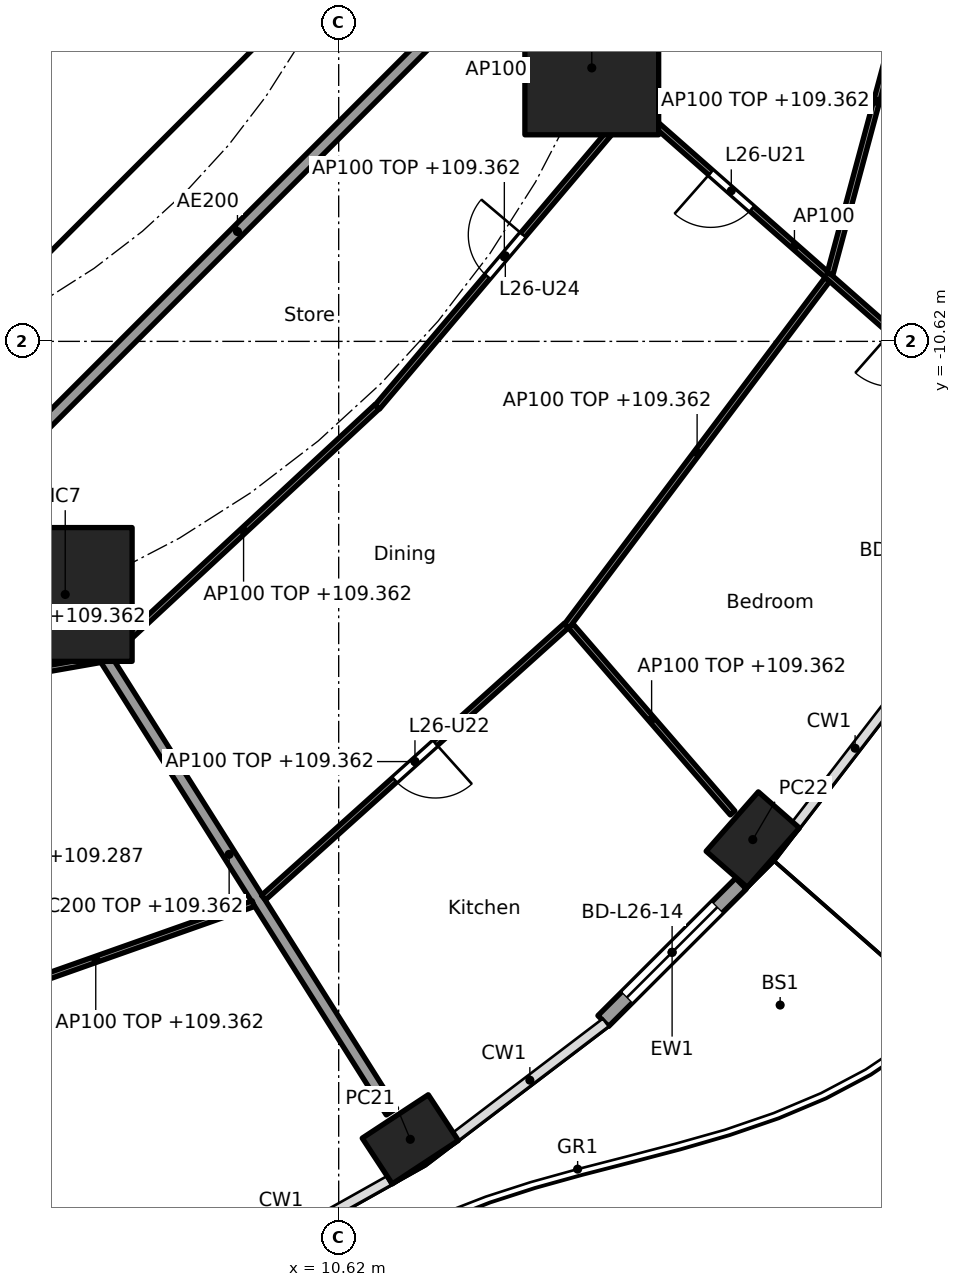
"""IFC4 building model, lengths in metres.
Left out: names, types, materials, properties, quantities, classifications, styles, units other than length and angle.
Written with IfcOpenShell. Run it as: python <this file> out.ifc"""

import sys

from ifc_helpers import new_model, si_unit, direction, frame, frame_2d, origin, origin_2d, place, context, subcontext, project, spatial, rectangle, hollow_rectangle, extrude, element, fill, save


model = new_model("IFC4")
c1 = context("Model", 3, precision=1e-05, world=origin(), true_north=direction((0.0, 1.0)))
c2 = subcontext(c1, "Body", "Model", "MODEL_VIEW")
j1 = project(units=[si_unit("LENGTHUNIT", "METRE"), si_unit("PLANEANGLEUNIT", "RADIAN")], contexts=[c1])
p1 = place(None, origin())
s1 = spatial("IfcSite", under=j1, at=p1, CompositionType="ELEMENT")
p2 = place(p1, origin())
s2 = spatial("IfcBuilding", under=s1, at=p2, CompositionType="ELEMENT")
p3 = place(p2, frame((0.0, 0.0, 106.6)))
s3 = spatial("IfcBuildingStorey", under=s2, at=p3, CompositionType="ELEMENT", Elevation=106.6)
for number, where, z_axis, x_axis in (
    (1, (11.798, -23.742, 0.0), (0.0, 0.0, 1.0), (0.836, 0.549, 0.0)),
    (2, (17.43, -18.813, 0.0), (0.0, 0.0, 1.0), (0.66, 0.751, 0.0)),
):
    element("IfcColumn", number, at=place(p3, frame(where, z_axis=z_axis, x_axis=x_axis)), inside=s3, PredefinedType="COLUMN", context=c2, shape_type="SweptSolid", body=[
        extrude(hollow_rectangle(XDim=1.3, YDim=0.9, WallThickness=0.045, at=origin_2d()), origin(), (0.0, 0.0, 1.0), 3.7),
    ])
for number, where, z_axis, x_axis in (
    (3, (6.123, -14.782, 0.0), (0.0, 0.0, 1.0), (1.0, 0.0, 0.0)),
    (4, (14.782, -6.123, 0.0), (0.0, 0.0, 1.0), (1.0, 0.0, 0.0)),
):
    element("IfcColumn", number, at=place(p3, frame(where, z_axis=z_axis, x_axis=x_axis)), inside=s3, PredefinedType="COLUMN", context=c2, shape_type="SweptSolid", body=[
        extrude(rectangle(XDim=2.2, YDim=2.2, at=origin_2d()), origin(), (0.0, 0.0, 1.0), 3.7),
    ])
p4 = place(p3, frame((17.235, -19.537, 0.0), z_axis=(0.0, 0.0, 1.0), x_axis=(-0.707793551437, -0.706419343269, 0.0)))
e5 = element("IfcWall", 5, at=p4, inside=s3, PredefinedType="SOLIDWALL", context=c2, shape_type="SweptSolid", body=[
    extrude(rectangle(XDim=3.198, YDim=0.25, at=frame_2d((1.599, 0.0))), origin(), (0.0, 0.0, 1.0), 3.44),
])
p5 = place(p4, frame((0.549, 0.0, 0.0)))
e6 = element("IfcOpeningElement", 6, at=p5, cuts=e5, PredefinedType="OPENING", context=c2, shape_type="SweptSolid", body=[
    extrude(rectangle(XDim=2.1, YDim=2.4, at=frame_2d((1.05, 1.2))), frame((0.0, 0.135, 0.0), z_axis=(0.0, -1.0, 0.0), x_axis=(1.0, 0.0, 0.0)), (0.0, 0.0, 1.0), 0.27),
])
p6 = place(p3, frame((4.613, -9.988, 0.0), z_axis=(0.0, 0.0, 1.0), x_axis=(0.707106781187, 0.707106781187, 0.0)))
e7 = element("IfcWall", 7, at=p6, inside=s3, PredefinedType="SHEAR", context=c2, shape_type="SweptSolid", body=[
    extrude(rectangle(XDim=7.602, YDim=0.6, at=frame_2d((3.801, 0.0))), origin(), (0.0, 0.0, 1.0), 3.44),
])
p7 = place(p6, frame((3.201, 0.0, 0.0)))
e8 = element("IfcOpeningElement", 8, at=p7, cuts=e7, PredefinedType="OPENING", context=c2, shape_type="SweptSolid", body=[
    extrude(rectangle(XDim=1.2, YDim=2.1, at=frame_2d((0.6, 1.05))), frame((0.0, 0.31, 0.0), z_axis=(0.0, -1.0, 0.0), x_axis=(1.0, 0.0, 0.0)), (0.0, 0.0, 1.0), 0.62),
])
p8 = place(p3, frame((5.243, -12.657, 0.0), z_axis=(0.0, 0.0, 1.0), x_axis=(0.382747093259, -0.923853160736, 0.0)))
e9 = element("IfcWall", 9, at=p8, inside=s3, PredefinedType="PARTITIONING", context=c2, shape_type="SweptSolid", body=[
    extrude(rectangle(XDim=2.2, YDim=0.2, at=frame_2d((1.1, 0.0))), origin(), (0.0, 0.0, 1.0), 3.44),
])
p9 = place(p3, frame((6.15, -14.824, 0.0), z_axis=(0.0, 0.0, 1.0), x_axis=(0.533492589682, -0.845804739142, 0.0)))
e10 = element("IfcWall", 10, at=p9, inside=s3, PredefinedType="PARTITIONING", context=c2, shape_type="SweptSolid", body=[
    extrude(rectangle(XDim=10.006, YDim=0.2, at=frame_2d((5.003, 0.0))), origin(), (0.0, 0.0, 1.0), 2.762),
])
p10 = place(p3, frame((5.275, -12.494, 0.0), z_axis=(0.0, 0.0, 1.0), x_axis=(0.707106781187, 0.707106781187, 0.0)))
e11 = element("IfcWall", 11, at=p10, inside=s3, PredefinedType="PARTITIONING", context=c2, shape_type="SweptSolid", body=[
    extrude(rectangle(XDim=10.409, YDim=0.2, at=frame_2d((5.205, 0.0))), origin(), (0.0, 0.0, 1.0), 3.44),
])
p11 = place(p3, frame((2.667, -16.558, 0.0), z_axis=(0.0, 0.0, 1.0), x_axis=(0.984996445375, 0.172574629069, 0.0)))
e12 = element("IfcWall", 12, at=p11, inside=s3, PredefinedType="PARTITIONING", context=c2, shape_type="SweptSolid", body=[
    extrude(rectangle(XDim=4.084, YDim=0.1, at=frame_2d((2.042, 0.0))), origin(), (0.0, 0.0, 1.0), 2.762),
])
p12 = place(p3, frame((4.034, -21.698, 0.0), z_axis=(0.0, 0.0, 1.0), x_axis=(0.942861482644, 0.33318497047, 0.0)))
e13 = element("IfcWall", 13, at=p12, inside=s3, PredefinedType="PARTITIONING", context=c2, shape_type="SweptSolid", body=[
    extrude(rectangle(XDim=5.495, YDim=0.1, at=frame_2d((2.748, 0.0))), origin(), (0.0, 0.0, 1.0), 2.762),
])
p13 = place(p3, frame((6.861, -15.768, 0.0), z_axis=(0.0, 0.0, 1.0), x_axis=(0.733011256509, 0.680216508056, 0.0)))
e14 = element("IfcWall", 14, at=p13, inside=s3, PredefinedType="PARTITIONING", context=c2, shape_type="SweptSolid", body=[
    extrude(rectangle(XDim=5.989, YDim=0.1, at=frame_2d((2.994, 0.0))), origin(), (0.0, 0.0, 1.0), 2.762),
])
p14 = place(p3, frame((9.384, -19.768, 0.0), z_axis=(0.0, 0.0, 1.0), x_axis=(0.74387407395, 0.668319805262, 0.0)))
e15 = element("IfcWall", 15, at=p14, inside=s3, PredefinedType="PARTITIONING", context=c2, shape_type="SweptSolid", body=[
    extrude(rectangle(XDim=6.695, YDim=0.1, at=frame_2d((3.348, 0.0))), origin(), (0.0, 0.0, 1.0), 2.762),
])
p15 = place(p14, frame((2.898, 0.0, 0.0)))
e16 = element("IfcOpeningElement", 16, at=p15, cuts=e15, PredefinedType="OPENING", context=c2, shape_type="SweptSolid", body=[
    extrude(rectangle(XDim=0.9, YDim=2.1, at=frame_2d((0.45, 1.05))), frame((0.0, 0.06, 0.0), z_axis=(0.0, -1.0, 0.0), x_axis=(1.0, 0.0, 0.0)), (0.0, 0.0, 1.0), 0.12),
])
p16 = place(p3, frame((11.255, -11.699, 0.0), z_axis=(0.0, 0.0, 1.0), x_axis=(0.64610637779, 0.763247370503, 0.0)))
e17 = element("IfcWall", 17, at=p16, inside=s3, PredefinedType="PARTITIONING", context=c2, shape_type="SweptSolid", body=[
    extrude(rectangle(XDim=6.467, YDim=0.1, at=frame_2d((3.233, 0.0))), origin(), (0.0, 0.0, 1.0), 2.762),
])
p17 = place(p16, frame((2.809, 0.0, 0.0)))
e18 = element("IfcOpeningElement", 18, at=p17, cuts=e17, PredefinedType="OPENING", context=c2, shape_type="SweptSolid", body=[
    extrude(rectangle(XDim=0.9, YDim=2.1, at=frame_2d((0.45, 1.05))), frame((0.0, 0.06, 0.0), z_axis=(0.0, -1.0, 0.0), x_axis=(1.0, 0.0, 0.0)), (0.0, 0.0, 1.0), 0.12),
])
p18 = place(p3, frame((14.435, -15.297, 0.0), z_axis=(0.0, 0.0, 1.0), x_axis=(0.654405107766, -0.756144136345, 0.0)))
e19 = element("IfcWall", 19, at=p18, inside=s3, PredefinedType="PARTITIONING", context=c2, shape_type="SweptSolid", body=[
    extrude(rectangle(XDim=4.07, YDim=0.1, at=frame_2d((2.035, 0.0))), origin(), (0.0, 0.0, 1.0), 2.762),
])
p19 = place(p3, frame((14.372, -15.3, 0.0), z_axis=(0.0, 0.0, 1.0), x_axis=(0.600996629562, 0.79925155693, 0.0)))
e20 = element("IfcWall", 20, at=p19, inside=s3, PredefinedType="PARTITIONING", context=c2, shape_type="SweptSolid", body=[
    extrude(rectangle(XDim=7.13, YDim=0.1, at=frame_2d((3.565, 0.0))), origin(), (0.0, 0.0, 1.0), 2.762),
])
p20 = place(p3, frame((12.657, -5.243, 0.0), z_axis=(0.0, 0.0, 1.0), x_axis=(0.923848837015, -0.382757529444, 0.0)))
e21 = element("IfcWall", 21, at=p20, inside=s3, PredefinedType="PARTITIONING", context=c2, shape_type="SweptSolid", body=[
    extrude(rectangle(XDim=2.25, YDim=0.1, at=frame_2d((1.125, 0.0))), origin(), (0.0, 0.0, 1.0), 3.44),
])
p21 = place(p3, frame((14.82, -6.156, 0.0), z_axis=(0.0, 0.0, 1.0), x_axis=(0.750582231659, -0.660777052808, 0.0)))
e22 = element("IfcWall", 22, at=p21, inside=s3, PredefinedType="PARTITIONING", context=c2, shape_type="SweptSolid", body=[
    extrude(rectangle(XDim=8.781, YDim=0.1, at=frame_2d((4.391, 0.0))), origin(), (0.0, 0.0, 1.0), 3.44),
])
p22 = place(p21, frame((2.557, 0.0, 0.0)))
e23 = element("IfcOpeningElement", 23, at=p22, cuts=e22, PredefinedType="OPENING", context=c2, shape_type="SweptSolid", body=[
    extrude(rectangle(XDim=0.9, YDim=2.1, at=frame_2d((0.45, 1.05))), frame((0.0, 0.06, 0.0), z_axis=(0.0, -1.0, 0.0), x_axis=(1.0, 0.0, 0.0)), (0.0, 0.0, 1.0), 0.12),
])
p23 = place(p21, frame((6.517, 0.0, 0.0)))
e24 = element("IfcOpeningElement", 24, at=p23, cuts=e22, PredefinedType="OPENING", context=c2, shape_type="SweptSolid", body=[
    extrude(rectangle(XDim=0.9, YDim=2.1, at=frame_2d((0.45, 1.05))), frame((0.0, 0.06, 0.0), z_axis=(0.0, -1.0, 0.0), x_axis=(1.0, 0.0, 0.0)), (0.0, 0.0, 1.0), 0.12),
])
p24 = place(p3, frame((15.471, -6.675, 0.0), z_axis=(0.0, 0.0, 1.0), x_axis=(0.107572661837, 0.994197225114, 0.0)))
e25 = element("IfcWall", 25, at=p24, inside=s3, PredefinedType="PARTITIONING", context=c2, shape_type="SweptSolid", body=[
    extrude(rectangle(XDim=4.022, YDim=0.1, at=frame_2d((2.011, 0.0))), origin(), (0.0, 0.0, 1.0), 2.762),
])
p25 = place(p3, frame((18.7, -9.512, 0.0), z_axis=(0.0, 0.0, 1.0), x_axis=(0.260265138035, 0.965537186194, 0.0)))
e26 = element("IfcWall", 26, at=p25, inside=s3, PredefinedType="PARTITIONING", context=c2, shape_type="SweptSolid", body=[
    extrude(rectangle(XDim=5.884, YDim=0.1, at=frame_2d((2.942, 0.0))), origin(), (0.0, 0.0, 1.0), 2.762),
])
p26 = place(p5, origin())
e27 = element("IfcDoor", 27, at=p26, inside=s3, OperationType="SLIDING_TO_LEFT", PredefinedType="DOOR", context=c2, shape_type="SweptSolid", body=[
    extrude(rectangle(XDim=2.1, YDim=2.4, at=frame_2d((1.05, 1.2))), frame((0.0, 0.025, 0.0), z_axis=(0.0, -1.0, 0.0), x_axis=(1.0, 0.0, 0.0)), (0.0, 0.0, 1.0), 0.05),
])
fill(e6, e27)
p27 = place(p7, origin())
e28 = element("IfcDoor", 28, at=p27, inside=s3, OperationType="SINGLE_SWING_RIGHT", PredefinedType="DOOR", context=c2, shape_type="SweptSolid", body=[
    extrude(rectangle(XDim=1.2, YDim=2.1, at=frame_2d((0.6, 1.05))), frame((0.0, 0.025, 0.0), z_axis=(0.0, -1.0, 0.0), x_axis=(1.0, 0.0, 0.0)), (0.0, 0.0, 1.0), 0.05),
])
fill(e8, e28)
p28 = place(p22, frame((0.9, 0.0, 0.0), x_axis=(-1.0, 0.0, 0.0)))
e29 = element("IfcDoor", 29, at=p28, inside=s3, OperationType="SINGLE_SWING_RIGHT", PredefinedType="DOOR", context=c2, shape_type="SweptSolid", body=[
    extrude(rectangle(XDim=0.9, YDim=2.1, at=frame_2d((0.45, 1.05))), frame((0.0, 0.025, 0.0), z_axis=(0.0, -1.0, 0.0), x_axis=(1.0, 0.0, 0.0)), (0.0, 0.0, 1.0), 0.05),
])
fill(e23, e29)
p29 = place(p15, frame((0.9, 0.0, 0.0), x_axis=(-1.0, 0.0, 0.0)))
e30 = element("IfcDoor", 30, at=p29, inside=s3, OperationType="SINGLE_SWING_LEFT", PredefinedType="DOOR", context=c2, shape_type="SweptSolid", body=[
    extrude(rectangle(XDim=0.9, YDim=2.1, at=frame_2d((0.45, 1.05))), frame((0.0, 0.025, 0.0), z_axis=(0.0, -1.0, 0.0), x_axis=(1.0, 0.0, 0.0)), (0.0, 0.0, 1.0), 0.05),
])
fill(e16, e30)
p30 = place(p17, origin())
e31 = element("IfcDoor", 31, at=p30, inside=s3, OperationType="SINGLE_SWING_RIGHT", PredefinedType="DOOR", context=c2, shape_type="SweptSolid", body=[
    extrude(rectangle(XDim=0.9, YDim=2.1, at=frame_2d((0.45, 1.05))), frame((0.0, 0.025, 0.0), z_axis=(0.0, -1.0, 0.0), x_axis=(1.0, 0.0, 0.0)), (0.0, 0.0, 1.0), 0.05),
])
fill(e18, e31)
save(model, sys.argv[1])
